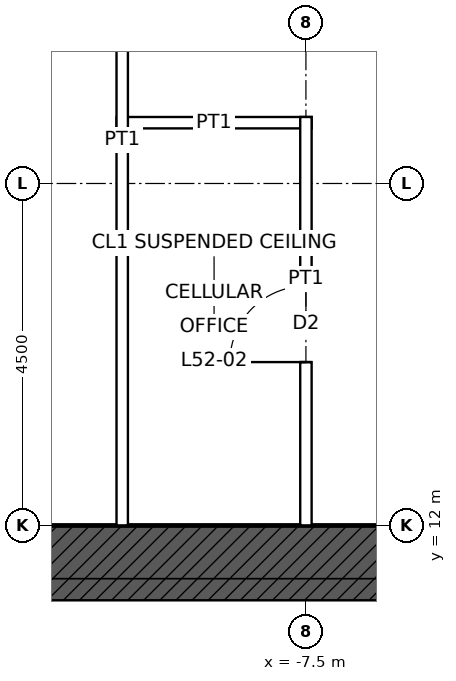
"""IFC4 building model, lengths in metres.
Left out: names, types, materials, properties, quantities, classifications, styles, units other than length and angle.
Written with IfcOpenShell. Run it as: python <this file> out.ifc"""

import sys

from ifc_helpers import new_model, si_unit, direction, frame, frame_2d, origin, place, context, subcontext, project, spatial, rectangle, extrude, element, fill, save


model = new_model("IFC4")
c1 = context("Model", 3, precision=1e-05, world=origin(), true_north=direction((0.0, 1.0)))
c2 = subcontext(c1, "Body", "Model", "MODEL_VIEW")
j1 = project(units=[si_unit("LENGTHUNIT", "METRE"), si_unit("PLANEANGLEUNIT", "RADIAN")], contexts=[c1])
p1 = place(None, origin())
s1 = spatial("IfcSite", under=j1, at=p1, CompositionType="ELEMENT")
p2 = place(p1, origin())
s2 = spatial("IfcBuilding", under=s1, at=p2, CompositionType="ELEMENT")
p3 = place(p2, frame((0.0, 0.0, 241.9)))
s3 = spatial("IfcBuildingStorey", under=s2, at=p3, CompositionType="ELEMENT", Elevation=241.9)
p4 = place(p3, frame((-12.0, 11.5, 0.0), z_axis=(0.0, 0.0, 1.0), x_axis=(1.0, 0.0, 0.0)))
e1 = element("IfcWall", 1, at=p4, inside=s3, PredefinedType="SHEAR", context=c2, shape_type="SweptSolid", body=[
    extrude(rectangle(XDim=24.0, YDim=1.0, at=frame_2d((12.0, 0.0))), origin(), (0.0, 0.0, 1.0), 4.0),
])
p5 = place(p4, frame((6.25, 0.0, 0.0)))
e2 = element("IfcOpeningElement", 2, at=p5, cuts=e1, PredefinedType="OPENING", context=c2, shape_type="SweptSolid", body=[
    extrude(rectangle(XDim=1.0, YDim=2.4, at=frame_2d((0.5, 1.2))), frame((0.0, 0.51, 0.0), z_axis=(0.0, -1.0, 0.0), x_axis=(1.0, 0.0, 0.0)), (0.0, 0.0, 1.0), 1.02),
])
p6 = place(p4, frame((16.75, 0.0, 0.0)))
e3 = element("IfcOpeningElement", 3, at=p6, cuts=e1, PredefinedType="OPENING", context=c2, shape_type="SweptSolid", body=[
    extrude(rectangle(XDim=1.0, YDim=2.4, at=frame_2d((0.5, 1.2))), frame((0.0, 0.51, 0.0), z_axis=(0.0, -1.0, 0.0), x_axis=(1.0, 0.0, 0.0)), (0.0, 0.0, 1.0), 1.02),
])
p7 = place(p3, frame((-9.992, 17.3, 0.0), z_axis=(0.0, 0.0, 1.0), x_axis=(1.0, 0.0, 0.0)))
e4 = element("IfcWall", 4, at=p7, inside=s3, PredefinedType="PARTITIONING", context=c2, shape_type="SweptSolid", body=[
    extrude(rectangle(XDim=2.567, YDim=0.15, at=frame_2d((1.283, 0.0))), origin(), (0.0, 0.0, 1.0), 3.85),
])
p8 = place(p3, frame((-9.917, 12.0, 0.0), z_axis=(0.0, 0.0, 1.0), x_axis=(0.0, 1.0, 0.0)))
e5 = element("IfcWall", 5, at=p8, inside=s3, PredefinedType="PARTITIONING", context=c2, shape_type="SweptSolid", body=[
    extrude(rectangle(XDim=10.15, YDim=0.15, at=frame_2d((5.075, 0.0))), origin(), (0.0, 0.0, 1.0), 3.85),
])
p9 = place(p3, frame((-7.5, 12.0, 0.0), z_axis=(0.0, 0.0, 1.0), x_axis=(0.0, 1.0, 0.0)))
e6 = element("IfcWall", 6, at=p9, inside=s3, PredefinedType="PARTITIONING", context=c2, shape_type="SweptSolid", body=[
    extrude(rectangle(XDim=5.375, YDim=0.15, at=frame_2d((2.688, 0.0))), origin(), (0.0, 0.0, 1.0), 3.238),
])
p10 = place(p9, frame((2.15, 0.0, 0.0)))
e7 = element("IfcOpeningElement", 7, at=p10, cuts=e6, PredefinedType="OPENING", context=c2, shape_type="SweptSolid", body=[
    extrude(rectangle(XDim=1.0, YDim=2.1, at=frame_2d((0.5, 1.05))), frame((0.0, 0.085, 0.0), z_axis=(0.0, -1.0, 0.0), x_axis=(1.0, 0.0, 0.0)), (0.0, 0.0, 1.0), 0.17),
])
p11 = place(p10, origin())
e8 = element("IfcDoor", 8, at=p11, inside=s3, OperationType="SINGLE_SWING_LEFT", PredefinedType="DOOR", context=c2, shape_type="SweptSolid", body=[
    extrude(rectangle(XDim=1.0, YDim=2.1, at=frame_2d((0.5, 1.05))), frame((0.0, 0.025, 0.0), z_axis=(0.0, -1.0, 0.0), x_axis=(1.0, 0.0, 0.0)), (0.0, 0.0, 1.0), 0.05),
])
fill(e7, e8)
save(model, sys.argv[1])
